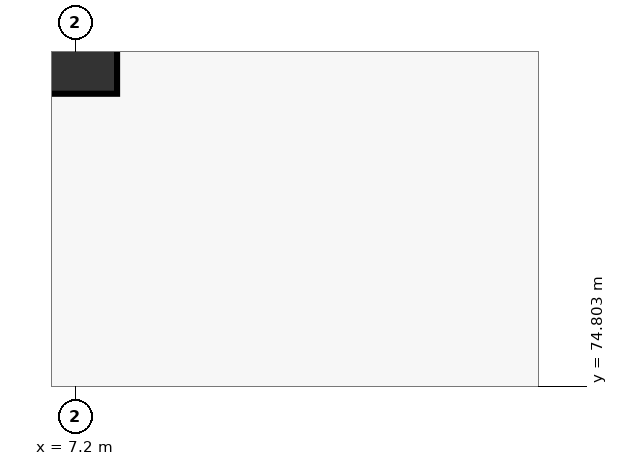
"""IFC4 building model, lengths in metres.
Left out: names, types, materials, properties, quantities, classifications, styles, units other than length and angle.
Written with IfcOpenShell. Run it as: python <this file> out.ifc"""

import sys

from ifc_helpers import new_model, si_unit, direction, frame, origin, origin_2d, place, context, subcontext, project, spatial, rectangle, extrude, element, save


model = new_model("IFC4")
c1 = context("Model", 3, precision=1e-05, world=origin(), true_north=direction((0.0, 1.0)))
c2 = subcontext(c1, "Body", "Model", "MODEL_VIEW")
j1 = project(units=[si_unit("LENGTHUNIT", "METRE"), si_unit("PLANEANGLEUNIT", "RADIAN")], contexts=[c1])
p1 = place(None, origin())
s1 = spatial("IfcSite", under=j1, at=p1, CompositionType="ELEMENT")
p2 = place(p1, origin())
s2 = spatial("IfcBuilding", under=s1, at=p2, CompositionType="ELEMENT")
p3 = place(p2, frame((0.0, 0.0, -5.4)))
s3 = spatial("IfcBuildingStorey", under=s2, at=p3, CompositionType="ELEMENT", Elevation=-5.4)
p4 = place(p3, frame((7.2, 79.2, 0.0), z_axis=(0.0, 0.0, 1.0), x_axis=(1.0, 0.0, 0.0)))
e1 = element("IfcColumn", 1, at=p4, inside=s3, PredefinedType="COLUMN", context=c2, shape_type="SweptSolid", body=[
    extrude(rectangle(XDim=1.1, YDim=1.1, at=origin_2d()), origin(), (0.0, 0.0, 1.0), 5.4),
])
save(model, sys.argv[1])
